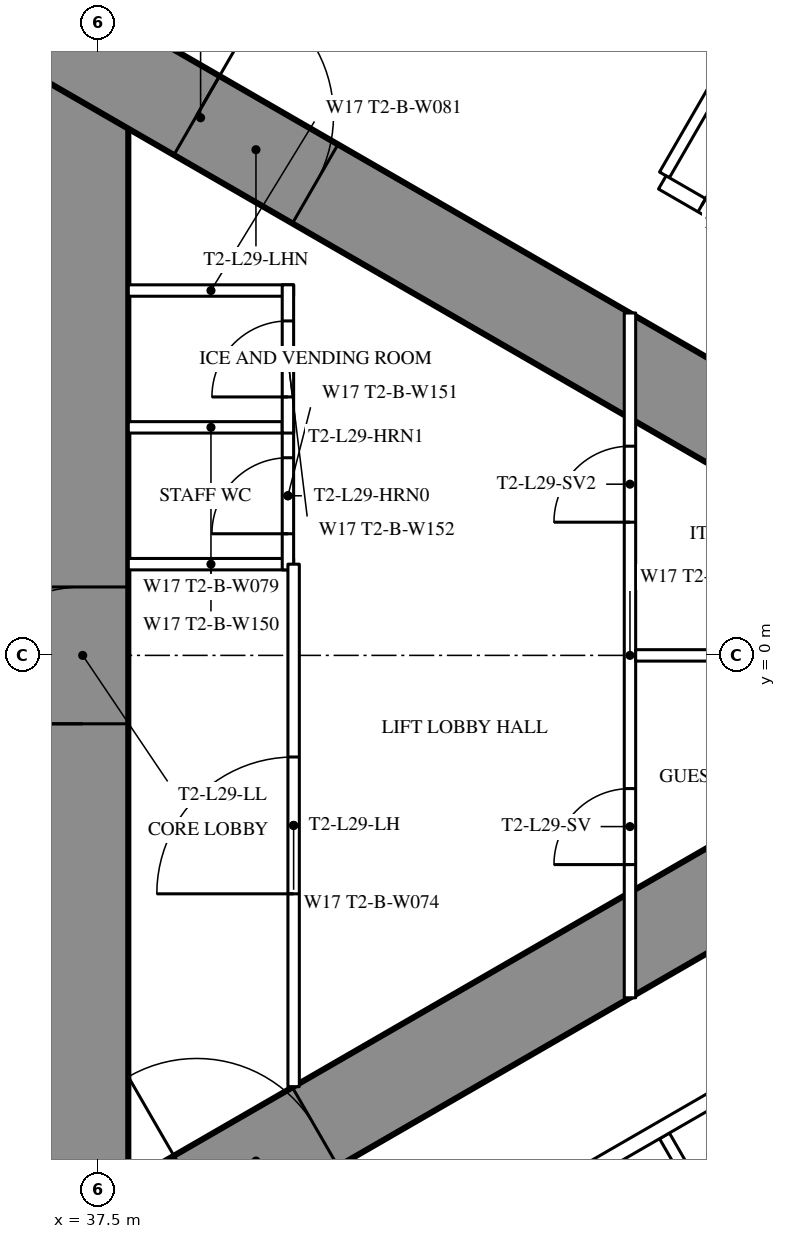
"""IFC4 building model, lengths in metres.
Left out: names, types, materials, properties, quantities, classifications, styles, units other than length and angle.
Written with IfcOpenShell. Run it as: python <this file> out.ifc"""

import sys

from ifc_helpers import new_model, si_unit, direction, frame, frame_2d, origin, place, context, subcontext, project, spatial, rectangle, extrude, element, fill, save


model = new_model("IFC4")
c1 = context("Model", 3, precision=1e-05, world=origin(), true_north=direction((0.0, 1.0)))
c2 = subcontext(c1, "Body", "Model", "MODEL_VIEW")
j1 = project(units=[si_unit("LENGTHUNIT", "METRE"), si_unit("PLANEANGLEUNIT", "RADIAN")], contexts=[c1])
p1 = place(None, origin())
s1 = spatial("IfcSite", under=j1, at=p1, CompositionType="ELEMENT")
p2 = place(p1, origin())
s2 = spatial("IfcBuilding", under=s1, at=p2, CompositionType="ELEMENT")
p3 = place(p2, frame((0.0, 0.0, 111.6)))
s3 = spatial("IfcBuildingStorey", under=s2, at=p3, CompositionType="ELEMENT", Elevation=111.6)
p4 = place(p3, frame((37.3, -8.6, 0.0), z_axis=(0.0, 0.0, 1.0), x_axis=(0.0, 1.0, 0.0)))
e1 = element("IfcWall", 1, at=p4, inside=s3, PredefinedType="SHEAR", context=c2, shape_type="SweptSolid", body=[
    extrude(rectangle(XDim=17.2, YDim=1.2, at=frame_2d((8.6, 0.0))), origin(), (0.0, 0.0, 1.0), 3.5),
])
p5 = place(p4, frame((7.7, 0.0, 0.0)))
e2 = element("IfcOpeningElement", 2, at=p5, cuts=e1, PredefinedType="OPENING", context=c2, shape_type="SweptSolid", body=[
    extrude(rectangle(XDim=1.8, YDim=2.2, at=frame_2d((0.9, 1.1))), frame((0.0, 0.61, 0.0), z_axis=(0.0, -1.0, 0.0), x_axis=(1.0, 0.0, 0.0)), (0.0, 0.0, 1.0), 1.22),
])
p6 = place(p3, frame((27.2, -13.8, 0.0), z_axis=(0.0, 0.0, 1.0), x_axis=(0.866027159892, 0.499996958321, 0.0)))
e3 = element("IfcWall", 3, at=p6, inside=s3, PredefinedType="SHEAR", context=c2, shape_type="SweptSolid", body=[
    extrude(rectangle(XDim=27.947, YDim=1.2, at=frame_2d((13.973, 0.0))), origin(), (0.0, 0.0, 1.0), 3.5),
])
p7 = place(p6, frame((4.6, 0.0, 0.0)))
e4 = element("IfcOpeningElement", 4, at=p7, cuts=e3, PredefinedType="OPENING", context=c2, shape_type="SweptSolid", body=[
    extrude(rectangle(XDim=1.0, YDim=2.2, at=frame_2d((0.5, 1.1))), frame((0.0, 0.61, 0.0), z_axis=(0.0, -1.0, 0.0), x_axis=(1.0, 0.0, 0.0)), (0.0, 0.0, 1.0), 1.22),
])
p8 = place(p6, frame((13.395, 0.0, 0.0)))
e5 = element("IfcOpeningElement", 5, at=p8, cuts=e3, PredefinedType="OPENING", context=c2, shape_type="SweptSolid", body=[
    extrude(rectangle(XDim=1.8, YDim=2.2, at=frame_2d((0.9, 1.1))), frame((0.0, 0.61, 0.0), z_axis=(0.0, -1.0, 0.0), x_axis=(1.0, 0.0, 0.0)), (0.0, 0.0, 1.0), 1.22),
])
p9 = place(p3, frame((27.2, 13.8, 0.0), z_axis=(0.0, 0.0, 1.0), x_axis=(0.866024515034, -0.500001539357, 0.0)))
e6 = element("IfcWall", 6, at=p9, inside=s3, PredefinedType="SHEAR", context=c2, shape_type="SweptSolid", body=[
    extrude(rectangle(XDim=26.907, YDim=1.2, at=frame_2d((13.454, 0.0))), origin(), (0.0, 0.0, 1.0), 3.5),
])
p10 = place(p9, frame((4.6, 0.0, 0.0)))
e7 = element("IfcOpeningElement", 7, at=p10, cuts=e6, PredefinedType="OPENING", context=c2, shape_type="SweptSolid", body=[
    extrude(rectangle(XDim=1.0, YDim=2.2, at=frame_2d((0.5, 1.1))), frame((0.0, 0.61, 0.0), z_axis=(0.0, -1.0, 0.0), x_axis=(1.0, 0.0, 0.0)), (0.0, 0.0, 1.0), 1.22),
])
p11 = place(p9, frame((13.395, 0.0, 0.0)))
e8 = element("IfcOpeningElement", 8, at=p11, cuts=e6, PredefinedType="OPENING", context=c2, shape_type="SweptSolid", body=[
    extrude(rectangle(XDim=1.8, YDim=2.2, at=frame_2d((0.9, 1.1))), frame((0.0, 0.61, 0.0), z_axis=(0.0, -1.0, 0.0), x_axis=(1.0, 0.0, 0.0)), (0.0, 0.0, 1.0), 1.22),
])
p12 = place(p3, frame((44.954, -6.321, 0.0), z_axis=(0.0, 0.0, 1.0), x_axis=(0.500018676722, -0.866014620505, 0.0)))
e9 = element("IfcWall", 9, at=p12, inside=s3, PredefinedType="PARTITIONING", context=c2, shape_type="SweptSolid", body=[
    extrude(rectangle(XDim=8.704, YDim=0.15, at=frame_2d((4.352, 0.0))), origin(), (0.0, 0.0, 1.0), 2.2),
])
p13 = place(p3, frame((44.954, 6.321, 0.0), z_axis=(0.0, 0.0, 1.0), x_axis=(0.500009815811, 0.866019736549, 0.0)))
e10 = element("IfcWall", 10, at=p13, inside=s3, PredefinedType="PARTITIONING", context=c2, shape_type="SweptSolid", body=[
    extrude(rectangle(XDim=11.424, YDim=0.15, at=frame_2d((5.712, 0.0))), origin(), (0.0, 0.0, 1.0), 3.25),
])
p14 = place(p3, frame((37.96, -10.243, 0.0), z_axis=(0.0, 0.0, 1.0), x_axis=(0.866026429433, 0.499998223521, 0.0)))
e11 = element("IfcWall", 11, at=p14, inside=s3, PredefinedType="PARTITIONING", context=c2, shape_type="SweptSolid", body=[
    extrude(rectangle(XDim=20.487, YDim=0.2, at=frame_2d((10.243, 0.0))), origin(), (0.0, 0.0, 1.0), 3.25),
])
p15 = place(p14, frame((4.343, 0.0, 0.0)))
e12 = element("IfcOpeningElement", 12, at=p15, cuts=e11, PredefinedType="OPENING", context=c2, shape_type="SweptSolid", body=[
    extrude(rectangle(XDim=0.95, YDim=2.2, at=frame_2d((0.475, 1.1))), frame((0.0, 0.11, 0.0), z_axis=(0.0, -1.0, 0.0), x_axis=(1.0, 0.0, 0.0)), (0.0, 0.0, 1.0), 0.22),
])
p16 = place(p14, frame((15.385, 0.0, 0.0)))
e13 = element("IfcOpeningElement", 13, at=p16, cuts=e11, PredefinedType="OPENING", context=c2, shape_type="SweptSolid", body=[
    extrude(rectangle(XDim=0.95, YDim=2.2, at=frame_2d((0.475, 1.1))), frame((0.0, 0.11, 0.0), z_axis=(0.0, -1.0, 0.0), x_axis=(1.0, 0.0, 0.0)), (0.0, 0.0, 1.0), 0.22),
])
p17 = place(p14, frame((17.085, 0.0, 0.0)))
e14 = element("IfcOpeningElement", 14, at=p17, cuts=e11, PredefinedType="OPENING", context=c2, shape_type="SweptSolid", body=[
    extrude(rectangle(XDim=0.95, YDim=2.2, at=frame_2d((0.475, 1.1))), frame((0.0, 0.11, 0.0), z_axis=(0.0, -1.0, 0.0), x_axis=(1.0, 0.0, 0.0)), (0.0, 0.0, 1.0), 0.22),
])
p18 = place(p14, frame((1.048, 0.0, 0.0)))
e15 = element("IfcOpeningElement", 15, at=p18, cuts=e11, PredefinedType="OPENING", context=c2, shape_type="SweptSolid", body=[
    extrude(rectangle(XDim=1.8, YDim=2.2, at=frame_2d((0.9, 1.1))), frame((0.0, 0.11, 0.0), z_axis=(0.0, -1.0, 0.0), x_axis=(1.0, 0.0, 0.0)), (0.0, 0.0, 1.0), 0.22),
])
p19 = place(p3, frame((44.925, 6.222, 0.0), z_axis=(0.0, 0.0, 1.0), x_axis=(0.866025590081, -0.499999677325, 0.0)))
e16 = element("IfcWall", 16, at=p19, inside=s3, PredefinedType="PARTITIONING", context=c2, shape_type="SweptSolid", body=[
    extrude(rectangle(XDim=12.324, YDim=0.2, at=frame_2d((6.162, 0.0))), origin(), (0.0, 0.0, 1.0), 3.25),
])
p20 = place(p19, frame((9.042, 0.0, 0.0)))
e17 = element("IfcOpeningElement", 17, at=p20, cuts=e16, PredefinedType="OPENING", context=c2, shape_type="SweptSolid", body=[
    extrude(rectangle(XDim=0.95, YDim=2.2, at=frame_2d((0.475, 1.1))), frame((0.0, 0.11, 0.0), z_axis=(0.0, -1.0, 0.0), x_axis=(1.0, 0.0, 0.0)), (0.0, 0.0, 1.0), 0.22),
])
p21 = place(p19, frame((7.342, 0.0, 0.0)))
e18 = element("IfcOpeningElement", 18, at=p21, cuts=e16, PredefinedType="OPENING", context=c2, shape_type="SweptSolid", body=[
    extrude(rectangle(XDim=0.95, YDim=2.2, at=frame_2d((0.475, 1.1))), frame((0.0, 0.11, 0.0), z_axis=(0.0, -1.0, 0.0), x_axis=(1.0, 0.0, 0.0)), (0.0, 0.0, 1.0), 0.22),
])
p22 = place(p19, frame((0.6, 0.0, 0.0)))
e19 = element("IfcOpeningElement", 19, at=p22, cuts=e16, PredefinedType="OPENING", context=c2, shape_type="SweptSolid", body=[
    extrude(rectangle(XDim=0.95, YDim=2.2, at=frame_2d((0.475, 1.1))), frame((0.0, 0.11, 0.0), z_axis=(0.0, -1.0, 0.0), x_axis=(1.0, 0.0, 0.0)), (0.0, 0.0, 1.0), 0.22),
])
for number, where, z_axis, x_axis in (
    (20, (37.9, 1.2, 0.0), (0.0, 0.0, 1.0), (1.0, 0.0, 0.0)),
    (21, (37.9, 3.0, 0.0), (0.0, 0.0, 1.0), (1.0, 0.0, 0.0)),
    (22, (37.9, 4.8, 0.0), (0.0, 0.0, 1.0), (1.0, 0.0, 0.0)),
):
    element("IfcWall", number, at=place(p3, frame(where, z_axis=z_axis, x_axis=x_axis)), inside=s3, PredefinedType="PARTITIONING", context=c2, shape_type="SweptSolid", body=[
        extrude(rectangle(XDim=2.175, YDim=0.15, at=frame_2d((1.087, 0.0))), origin(), (0.0, 0.0, 1.0), 3.25),
    ])
p23 = place(p3, frame((40.0, 1.125, 0.0), z_axis=(0.0, 0.0, 1.0), x_axis=(0.0, 1.0, 0.0)))
e23 = element("IfcWall", 23, at=p23, inside=s3, PredefinedType="PARTITIONING", context=c2, shape_type="SweptSolid", body=[
    extrude(rectangle(XDim=1.95, YDim=0.15, at=frame_2d((0.975, 0.0))), origin(), (0.0, 0.0, 1.0), 3.25),
])
p24 = place(p23, frame((0.475, 0.0, 0.0)))
e24 = element("IfcOpeningElement", 24, at=p24, cuts=e23, PredefinedType="OPENING", context=c2, shape_type="SweptSolid", body=[
    extrude(rectangle(XDim=1.0, YDim=2.2, at=frame_2d((0.5, 1.1))), frame((0.0, 0.085, 0.0), z_axis=(0.0, -1.0, 0.0), x_axis=(1.0, 0.0, 0.0)), (0.0, 0.0, 1.0), 0.17),
])
p25 = place(p3, frame((40.0, 2.925, 0.0), z_axis=(0.0, 0.0, 1.0), x_axis=(0.0, 1.0, 0.0)))
e25 = element("IfcWall", 25, at=p25, inside=s3, PredefinedType="PARTITIONING", context=c2, shape_type="SweptSolid", body=[
    extrude(rectangle(XDim=1.95, YDim=0.15, at=frame_2d((0.975, 0.0))), origin(), (0.0, 0.0, 1.0), 3.25),
])
p26 = place(p25, frame((0.475, 0.0, 0.0)))
e26 = element("IfcOpeningElement", 26, at=p26, cuts=e25, PredefinedType="OPENING", context=c2, shape_type="SweptSolid", body=[
    extrude(rectangle(XDim=1.0, YDim=2.2, at=frame_2d((0.5, 1.1))), frame((0.0, 0.085, 0.0), z_axis=(0.0, -1.0, 0.0), x_axis=(1.0, 0.0, 0.0)), (0.0, 0.0, 1.0), 0.17),
])
p27 = place(p3, frame((40.075, -5.674, 0.0), z_axis=(0.0, 0.0, 1.0), x_axis=(0.0, 1.0, 0.0)))
e27 = element("IfcWall", 27, at=p27, inside=s3, PredefinedType="PARTITIONING", context=c2, shape_type="SweptSolid", body=[
    extrude(rectangle(XDim=6.874, YDim=0.15, at=frame_2d((3.437, 0.0))), origin(), (0.0, 0.0, 1.0), 3.25),
])
p28 = place(p27, frame((2.537, 0.0, 0.0)))
e28 = element("IfcOpeningElement", 28, at=p28, cuts=e27, PredefinedType="OPENING", context=c2, shape_type="SweptSolid", body=[
    extrude(rectangle(XDim=1.8, YDim=2.2, at=frame_2d((0.9, 1.1))), frame((0.0, 0.085, 0.0), z_axis=(0.0, -1.0, 0.0), x_axis=(1.0, 0.0, 0.0)), (0.0, 0.0, 1.0), 0.17),
])
p29 = place(p3, frame((44.5, -4.505, 0.0), z_axis=(0.0, 0.0, 1.0), x_axis=(0.0, 1.0, 0.0)))
e29 = element("IfcWall", 29, at=p29, inside=s3, PredefinedType="PARTITIONING", context=c2, shape_type="SweptSolid", body=[
    extrude(rectangle(XDim=9.009, YDim=0.15, at=frame_2d((4.505, 0.0))), origin(), (0.0, 0.0, 1.0), 2.45),
])
p30 = place(p29, frame((1.752, 0.0, 0.0)))
e30 = element("IfcOpeningElement", 30, at=p30, cuts=e29, PredefinedType="OPENING", context=c2, shape_type="SweptSolid", body=[
    extrude(rectangle(XDim=1.0, YDim=2.2, at=frame_2d((0.5, 1.1))), frame((0.0, 0.085, 0.0), z_axis=(0.0, -1.0, 0.0), x_axis=(1.0, 0.0, 0.0)), (0.0, 0.0, 1.0), 0.17),
])
p31 = place(p29, frame((6.257, 0.0, 0.0)))
e31 = element("IfcOpeningElement", 31, at=p31, cuts=e29, PredefinedType="OPENING", context=c2, shape_type="SweptSolid", body=[
    extrude(rectangle(XDim=1.0, YDim=2.2, at=frame_2d((0.5, 1.1))), frame((0.0, 0.085, 0.0), z_axis=(0.0, -1.0, 0.0), x_axis=(1.0, 0.0, 0.0)), (0.0, 0.0, 1.0), 0.17),
])
p32 = place(p3, frame((44.575, 0.0, 0.0), z_axis=(0.0, 0.0, 1.0), x_axis=(1.0, 0.0, 0.0)))
e32 = element("IfcWall", 32, at=p32, inside=s3, PredefinedType="PARTITIONING", context=c2, shape_type="SweptSolid", body=[
    extrude(rectangle(XDim=7.727, YDim=0.15, at=frame_2d((3.864, 0.0))), origin(), (0.0, 0.0, 1.0), 2.2),
])
p33 = place(p22, origin())
e33 = element("IfcDoor", 33, at=p33, inside=s3, OperationType="SINGLE_SWING_LEFT", PredefinedType="DOOR", context=c2, shape_type="SweptSolid", body=[
    extrude(rectangle(XDim=0.95, YDim=2.2, at=frame_2d((0.475, 1.1))), frame((0.0, 0.025, 0.0), z_axis=(0.0, -1.0, 0.0), x_axis=(1.0, 0.0, 0.0)), (0.0, 0.0, 1.0), 0.05),
])
fill(e19, e33)
p34 = place(p24, origin())
e34 = element("IfcDoor", 34, at=p34, inside=s3, OperationType="SINGLE_SWING_LEFT", PredefinedType="DOOR", context=c2, shape_type="SweptSolid", body=[
    extrude(rectangle(XDim=1.0, YDim=2.2, at=frame_2d((0.5, 1.1))), frame((0.0, 0.025, 0.0), z_axis=(0.0, -1.0, 0.0), x_axis=(1.0, 0.0, 0.0)), (0.0, 0.0, 1.0), 0.05),
])
fill(e24, e34)
p35 = place(p26, origin())
e35 = element("IfcDoor", 35, at=p35, inside=s3, OperationType="SINGLE_SWING_LEFT", PredefinedType="DOOR", context=c2, shape_type="SweptSolid", body=[
    extrude(rectangle(XDim=1.0, YDim=2.2, at=frame_2d((0.5, 1.1))), frame((0.0, 0.025, 0.0), z_axis=(0.0, -1.0, 0.0), x_axis=(1.0, 0.0, 0.0)), (0.0, 0.0, 1.0), 0.05),
])
fill(e26, e35)
p36 = place(p28, origin())
e36 = element("IfcDoor", 36, at=p36, inside=s3, OperationType="DOUBLE_DOOR_SINGLE_SWING", PredefinedType="DOOR", context=c2, shape_type="SweptSolid", body=[
    extrude(rectangle(XDim=1.8, YDim=2.2, at=frame_2d((0.9, 1.1))), frame((0.0, 0.025, 0.0), z_axis=(0.0, -1.0, 0.0), x_axis=(1.0, 0.0, 0.0)), (0.0, 0.0, 1.0), 0.05),
])
fill(e28, e36)
p37 = place(p30, origin())
e37 = element("IfcDoor", 37, at=p37, inside=s3, OperationType="SINGLE_SWING_LEFT", PredefinedType="DOOR", context=c2, shape_type="SweptSolid", body=[
    extrude(rectangle(XDim=1.0, YDim=2.2, at=frame_2d((0.5, 1.1))), frame((0.0, 0.025, 0.0), z_axis=(0.0, -1.0, 0.0), x_axis=(1.0, 0.0, 0.0)), (0.0, 0.0, 1.0), 0.05),
])
fill(e30, e37)
p38 = place(p31, origin())
e38 = element("IfcDoor", 38, at=p38, inside=s3, OperationType="SINGLE_SWING_LEFT", PredefinedType="DOOR", context=c2, shape_type="SweptSolid", body=[
    extrude(rectangle(XDim=1.0, YDim=2.2, at=frame_2d((0.5, 1.1))), frame((0.0, 0.025, 0.0), z_axis=(0.0, -1.0, 0.0), x_axis=(1.0, 0.0, 0.0)), (0.0, 0.0, 1.0), 0.05),
])
fill(e31, e38)
p39 = place(p8, origin())
e39 = element("IfcDoor", 39, at=p39, inside=s3, OperationType="DOUBLE_DOOR_SINGLE_SWING", PredefinedType="DOOR", context=c2, shape_type="SweptSolid", body=[
    extrude(rectangle(XDim=1.8, YDim=2.2, at=frame_2d((0.9, 1.1))), frame((0.0, 0.025, 0.0), z_axis=(0.0, -1.0, 0.0), x_axis=(1.0, 0.0, 0.0)), (0.0, 0.0, 1.0), 0.05),
])
fill(e5, e39)
p40 = place(p11, origin())
e40 = element("IfcDoor", 40, at=p40, inside=s3, OperationType="DOUBLE_DOOR_SINGLE_SWING", PredefinedType="DOOR", context=c2, shape_type="SweptSolid", body=[
    extrude(rectangle(XDim=1.8, YDim=2.2, at=frame_2d((0.9, 1.1))), frame((0.0, 0.025, 0.0), z_axis=(0.0, -1.0, 0.0), x_axis=(1.0, 0.0, 0.0)), (0.0, 0.0, 1.0), 0.05),
])
fill(e8, e40)
p41 = place(p5, origin())
e41 = element("IfcDoor", 41, at=p41, inside=s3, OperationType="DOUBLE_DOOR_SINGLE_SWING", PredefinedType="DOOR", context=c2, shape_type="SweptSolid", body=[
    extrude(rectangle(XDim=1.8, YDim=2.2, at=frame_2d((0.9, 1.1))), frame((0.0, 0.025, 0.0), z_axis=(0.0, -1.0, 0.0), x_axis=(1.0, 0.0, 0.0)), (0.0, 0.0, 1.0), 0.05),
])
fill(e2, e41)
save(model, sys.argv[1])
